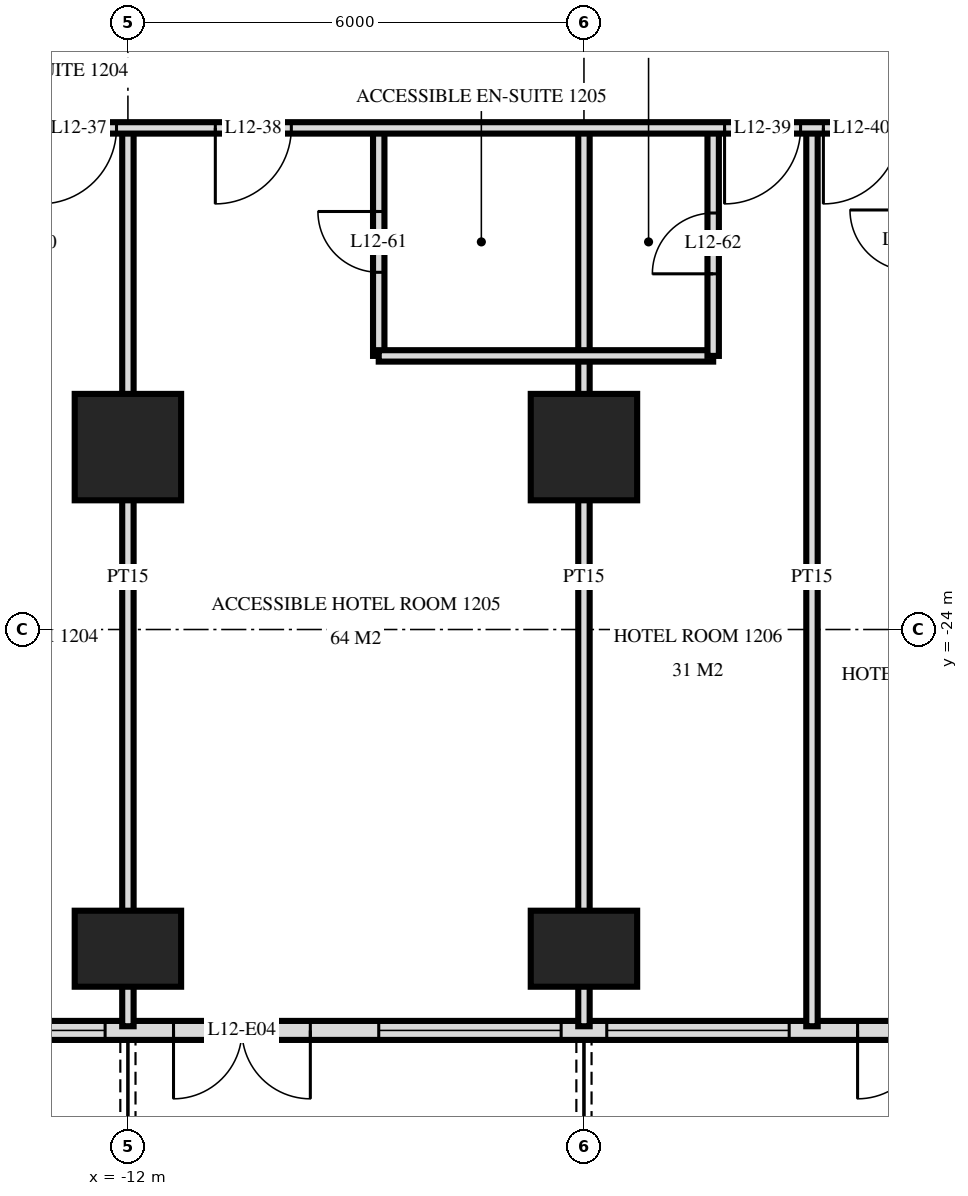
"""IFC4 building model, lengths in metres.
Left out: names, types, materials, properties, quantities, classifications, styles, units other than length and angle.
Written with IfcOpenShell. Run it as: python <this file> out.ifc"""

import sys

from ifc_helpers import new_model, si_unit, direction, frame, frame_2d, origin, origin_2d, place, context, subcontext, project, spatial, rectangle, extrude, element, fill, save


model = new_model("IFC4")
c1 = context("Model", 3, precision=1e-05, world=origin(), true_north=direction((0.0, 1.0)))
c2 = subcontext(c1, "Body", "Model", "MODEL_VIEW")
j1 = project(units=[si_unit("LENGTHUNIT", "METRE"), si_unit("PLANEANGLEUNIT", "RADIAN")], contexts=[c1])
p1 = place(None, origin())
s1 = spatial("IfcSite", under=j1, at=p1, CompositionType="ELEMENT")
p2 = place(p1, origin())
s2 = spatial("IfcBuilding", under=s1, at=p2, CompositionType="ELEMENT")
p3 = place(p2, frame((0.0, 0.0, 52.8)))
s3 = spatial("IfcBuildingStorey", under=s2, at=p3, CompositionType="ELEMENT", Elevation=52.8)
p4 = place(p3, frame((-12.0, -28.2, 0.0), z_axis=(0.0, 0.0, 1.0), x_axis=(1.0, 0.0, 0.0)))
e1 = element("IfcColumn", 1, at=p4, inside=s3, PredefinedType="COLUMN", context=c2, shape_type="SweptSolid", body=[
    extrude(rectangle(XDim=1.4, YDim=1.0, at=origin_2d()), origin(), (0.0, 0.0, 1.0), 3.6),
])
p5 = place(p3, frame((-12.0, -21.6, 0.0), z_axis=(0.0, 0.0, 1.0), x_axis=(1.0, 0.0, 0.0)))
e2 = element("IfcColumn", 2, at=p5, inside=s3, PredefinedType="COLUMN", context=c2, shape_type="SweptSolid", body=[
    extrude(rectangle(XDim=1.4, YDim=1.4, at=origin_2d()), origin(), (0.0, 0.0, 1.0), 3.6),
])
p6 = place(p3, frame((-6.0, -28.2, 0.0), z_axis=(0.0, 0.0, 1.0), x_axis=(1.0, 0.0, 0.0)))
e3 = element("IfcColumn", 3, at=p6, inside=s3, PredefinedType="COLUMN", context=c2, shape_type="SweptSolid", body=[
    extrude(rectangle(XDim=1.4, YDim=1.0, at=origin_2d()), origin(), (0.0, 0.0, 1.0), 3.6),
])
p7 = place(p3, frame((-6.0, -21.6, 0.0), z_axis=(0.0, 0.0, 1.0), x_axis=(1.0, 0.0, 0.0)))
e4 = element("IfcColumn", 4, at=p7, inside=s3, PredefinedType="COLUMN", context=c2, shape_type="SweptSolid", body=[
    extrude(rectangle(XDim=1.4, YDim=1.4, at=origin_2d()), origin(), (0.0, 0.0, 1.0), 3.6),
])
p8 = place(p3, frame((-28.775, -29.275, 0.0), z_axis=(0.0, 0.0, 1.0), x_axis=(1.0, 0.0, 0.0)))
e5 = element("IfcWall", 5, at=p8, inside=s3, PredefinedType="SOLIDWALL", context=c2, shape_type="SweptSolid", body=[
    extrude(rectangle(XDim=57.551, YDim=0.25, at=frame_2d((28.775, 0.0))), origin(), (0.0, 0.0, 1.0), 3.32),
])
p9 = place(p8, frame((0.575, 0.0, 0.0)))
e6 = element("IfcOpeningElement", 6, at=p9, cuts=e5, PredefinedType="OPENING", context=c2, shape_type="SweptSolid", body=[
    extrude(rectangle(XDim=1.8, YDim=2.4, at=frame_2d((0.9, 1.2))), frame((0.0, 0.135, 0.0), z_axis=(0.0, -1.0, 0.0), x_axis=(1.0, 0.0, 0.0)), (0.0, 0.0, 1.0), 0.27),
])
p10 = place(p8, frame((5.375, 0.0, 0.0)))
e7 = element("IfcOpeningElement", 7, at=p10, cuts=e5, PredefinedType="OPENING", context=c2, shape_type="SweptSolid", body=[
    extrude(rectangle(XDim=1.8, YDim=2.4, at=frame_2d((0.9, 1.2))), frame((0.0, 0.135, 0.0), z_axis=(0.0, -1.0, 0.0), x_axis=(1.0, 0.0, 0.0)), (0.0, 0.0, 1.0), 0.27),
])
p11 = place(p8, frame((8.075, 0.0, 0.3)))
e8 = element("IfcOpeningElement", 8, at=p11, cuts=e5, PredefinedType="OPENING", context=c2, shape_type="SweptSolid", body=[
    extrude(rectangle(XDim=2.4, YDim=2.1, at=frame_2d((1.2, 1.05))), frame((0.0, 0.135, 0.0), z_axis=(0.0, -1.0, 0.0), x_axis=(1.0, 0.0, 0.0)), (0.0, 0.0, 1.0), 0.27),
])
p12 = place(p8, frame((11.375, 0.0, 0.0)))
e9 = element("IfcOpeningElement", 9, at=p12, cuts=e5, PredefinedType="OPENING", context=c2, shape_type="SweptSolid", body=[
    extrude(rectangle(XDim=1.8, YDim=2.4, at=frame_2d((0.9, 1.2))), frame((0.0, 0.135, 0.0), z_axis=(0.0, -1.0, 0.0), x_axis=(1.0, 0.0, 0.0)), (0.0, 0.0, 1.0), 0.27),
])
p13 = place(p8, frame((14.075, 0.0, 0.3)))
e10 = element("IfcOpeningElement", 10, at=p13, cuts=e5, PredefinedType="OPENING", context=c2, shape_type="SweptSolid", body=[
    extrude(rectangle(XDim=2.4, YDim=2.1, at=frame_2d((1.2, 1.05))), frame((0.0, 0.135, 0.0), z_axis=(0.0, -1.0, 0.0), x_axis=(1.0, 0.0, 0.0)), (0.0, 0.0, 1.0), 0.27),
])
p14 = place(p8, frame((17.375, 0.0, 0.0)))
e11 = element("IfcOpeningElement", 11, at=p14, cuts=e5, PredefinedType="OPENING", context=c2, shape_type="SweptSolid", body=[
    extrude(rectangle(XDim=1.8, YDim=2.4, at=frame_2d((0.9, 1.2))), frame((0.0, 0.135, 0.0), z_axis=(0.0, -1.0, 0.0), x_axis=(1.0, 0.0, 0.0)), (0.0, 0.0, 1.0), 0.27),
])
p15 = place(p8, frame((20.075, 0.0, 0.3)))
e12 = element("IfcOpeningElement", 12, at=p15, cuts=e5, PredefinedType="OPENING", context=c2, shape_type="SweptSolid", body=[
    extrude(rectangle(XDim=2.4, YDim=2.1, at=frame_2d((1.2, 1.05))), frame((0.0, 0.135, 0.0), z_axis=(0.0, -1.0, 0.0), x_axis=(1.0, 0.0, 0.0)), (0.0, 0.0, 1.0), 0.27),
])
p16 = place(p8, frame((23.075, 0.0, 0.3)))
e13 = element("IfcOpeningElement", 13, at=p16, cuts=e5, PredefinedType="OPENING", context=c2, shape_type="SweptSolid", body=[
    extrude(rectangle(XDim=2.4, YDim=2.1, at=frame_2d((1.2, 1.05))), frame((0.0, 0.135, 0.0), z_axis=(0.0, -1.0, 0.0), x_axis=(1.0, 0.0, 0.0)), (0.0, 0.0, 1.0), 0.27),
])
p17 = place(p8, frame((26.375, 0.0, 0.0)))
e14 = element("IfcOpeningElement", 14, at=p17, cuts=e5, PredefinedType="OPENING", context=c2, shape_type="SweptSolid", body=[
    extrude(rectangle(XDim=1.8, YDim=2.4, at=frame_2d((0.9, 1.2))), frame((0.0, 0.135, 0.0), z_axis=(0.0, -1.0, 0.0), x_axis=(1.0, 0.0, 0.0)), (0.0, 0.0, 1.0), 0.27),
])
p18 = place(p8, frame((29.375, 0.0, 0.0)))
e15 = element("IfcOpeningElement", 15, at=p18, cuts=e5, PredefinedType="OPENING", context=c2, shape_type="SweptSolid", body=[
    extrude(rectangle(XDim=1.8, YDim=2.4, at=frame_2d((0.9, 1.2))), frame((0.0, 0.135, 0.0), z_axis=(0.0, -1.0, 0.0), x_axis=(1.0, 0.0, 0.0)), (0.0, 0.0, 1.0), 0.27),
])
p19 = place(p8, frame((32.075, 0.0, 0.3)))
e16 = element("IfcOpeningElement", 16, at=p19, cuts=e5, PredefinedType="OPENING", context=c2, shape_type="SweptSolid", body=[
    extrude(rectangle(XDim=2.4, YDim=2.1, at=frame_2d((1.2, 1.05))), frame((0.0, 0.135, 0.0), z_axis=(0.0, -1.0, 0.0), x_axis=(1.0, 0.0, 0.0)), (0.0, 0.0, 1.0), 0.27),
])
p20 = place(p8, frame((35.075, 0.0, 0.3)))
e17 = element("IfcOpeningElement", 17, at=p20, cuts=e5, PredefinedType="OPENING", context=c2, shape_type="SweptSolid", body=[
    extrude(rectangle(XDim=2.4, YDim=2.1, at=frame_2d((1.2, 1.05))), frame((0.0, 0.135, 0.0), z_axis=(0.0, -1.0, 0.0), x_axis=(1.0, 0.0, 0.0)), (0.0, 0.0, 1.0), 0.27),
])
p21 = place(p8, frame((38.375, 0.0, 0.0)))
e18 = element("IfcOpeningElement", 18, at=p21, cuts=e5, PredefinedType="OPENING", context=c2, shape_type="SweptSolid", body=[
    extrude(rectangle(XDim=1.8, YDim=2.4, at=frame_2d((0.9, 1.2))), frame((0.0, 0.135, 0.0), z_axis=(0.0, -1.0, 0.0), x_axis=(1.0, 0.0, 0.0)), (0.0, 0.0, 1.0), 0.27),
])
p22 = place(p8, frame((41.375, 0.0, 0.0)))
e19 = element("IfcOpeningElement", 19, at=p22, cuts=e5, PredefinedType="OPENING", context=c2, shape_type="SweptSolid", body=[
    extrude(rectangle(XDim=1.8, YDim=2.4, at=frame_2d((0.9, 1.2))), frame((0.0, 0.135, 0.0), z_axis=(0.0, -1.0, 0.0), x_axis=(1.0, 0.0, 0.0)), (0.0, 0.0, 1.0), 0.27),
])
p23 = place(p8, frame((44.075, 0.0, 0.3)))
e20 = element("IfcOpeningElement", 20, at=p23, cuts=e5, PredefinedType="OPENING", context=c2, shape_type="SweptSolid", body=[
    extrude(rectangle(XDim=2.4, YDim=2.1, at=frame_2d((1.2, 1.05))), frame((0.0, 0.135, 0.0), z_axis=(0.0, -1.0, 0.0), x_axis=(1.0, 0.0, 0.0)), (0.0, 0.0, 1.0), 0.27),
])
p24 = place(p8, frame((47.075, 0.0, 0.3)))
e21 = element("IfcOpeningElement", 21, at=p24, cuts=e5, PredefinedType="OPENING", context=c2, shape_type="SweptSolid", body=[
    extrude(rectangle(XDim=2.4, YDim=2.1, at=frame_2d((1.2, 1.05))), frame((0.0, 0.135, 0.0), z_axis=(0.0, -1.0, 0.0), x_axis=(1.0, 0.0, 0.0)), (0.0, 0.0, 1.0), 0.27),
])
p25 = place(p8, frame((50.375, 0.0, 0.0)))
e22 = element("IfcOpeningElement", 22, at=p25, cuts=e5, PredefinedType="OPENING", context=c2, shape_type="SweptSolid", body=[
    extrude(rectangle(XDim=1.8, YDim=2.4, at=frame_2d((0.9, 1.2))), frame((0.0, 0.135, 0.0), z_axis=(0.0, -1.0, 0.0), x_axis=(1.0, 0.0, 0.0)), (0.0, 0.0, 1.0), 0.27),
])
p26 = place(p8, frame((53.375, 0.0, 0.0)))
e23 = element("IfcOpeningElement", 23, at=p26, cuts=e5, PredefinedType="OPENING", context=c2, shape_type="SweptSolid", body=[
    extrude(rectangle(XDim=1.8, YDim=2.4, at=frame_2d((0.9, 1.2))), frame((0.0, 0.135, 0.0), z_axis=(0.0, -1.0, 0.0), x_axis=(1.0, 0.0, 0.0)), (0.0, 0.0, 1.0), 0.27),
])
p27 = place(p3, frame((-3.0, -29.22, 0.0), z_axis=(0.0, 0.0, 1.0), x_axis=(0.0, 1.0, 0.0)))
e24 = element("IfcWall", 24, at=p27, inside=s3, PredefinedType="PARTITIONING", context=c2, shape_type="SweptSolid", body=[
    extrude(rectangle(XDim=11.82, YDim=0.15, at=frame_2d((5.91, 0.0))), origin(), (0.0, 0.0, 1.0), 3.32),
])
p28 = place(p3, frame((-4.3, -20.4, 0.0), z_axis=(0.0, 0.0, 1.0), x_axis=(0.0, 1.0, 0.0)))
e25 = element("IfcWall", 25, at=p28, inside=s3, PredefinedType="PARTITIONING", context=c2, shape_type="SweptSolid", body=[
    extrude(rectangle(XDim=3.0, YDim=0.15, at=frame_2d((1.5, 0.0))), origin(), (0.0, 0.0, 1.0), 3.32),
])
p29 = place(p28, frame((1.08, 0.0, 0.0)))
e26 = element("IfcOpeningElement", 26, at=p29, cuts=e25, PredefinedType="OPENING", context=c2, shape_type="SweptSolid", body=[
    extrude(rectangle(XDim=0.8, YDim=2.1, at=frame_2d((0.4, 1.05))), frame((0.0, 0.085, 0.0), z_axis=(0.0, -1.0, 0.0), x_axis=(1.0, 0.0, 0.0)), (0.0, 0.0, 1.0), 0.17),
])
p30 = place(p3, frame((-6.0, -29.22, 0.0), z_axis=(0.0, 0.0, 1.0), x_axis=(0.0, 1.0, 0.0)))
e27 = element("IfcWall", 27, at=p30, inside=s3, PredefinedType="PARTITIONING", context=c2, shape_type="SweptSolid", body=[
    extrude(rectangle(XDim=11.82, YDim=0.15, at=frame_2d((5.91, 0.0))), origin(), (0.0, 0.0, 1.0), 3.32),
])
p31 = place(p3, frame((-8.7, -20.4, 0.0), z_axis=(0.0, 0.0, 1.0), x_axis=(0.0, 1.0, 0.0)))
e28 = element("IfcWall", 28, at=p31, inside=s3, PredefinedType="PARTITIONING", context=c2, shape_type="SweptSolid", body=[
    extrude(rectangle(XDim=3.0, YDim=0.15, at=frame_2d((1.5, 0.0))), origin(), (0.0, 0.0, 1.0), 3.32),
])
p32 = place(p31, frame((1.1, 0.0, 0.0)))
e29 = element("IfcOpeningElement", 29, at=p32, cuts=e28, PredefinedType="OPENING", context=c2, shape_type="SweptSolid", body=[
    extrude(rectangle(XDim=0.8, YDim=2.1, at=frame_2d((0.4, 1.05))), frame((0.0, 0.085, 0.0), z_axis=(0.0, -1.0, 0.0), x_axis=(1.0, 0.0, 0.0)), (0.0, 0.0, 1.0), 0.17),
])
p33 = place(p3, frame((-12.0, -29.22, 0.0), z_axis=(0.0, 0.0, 1.0), x_axis=(0.0, 1.0, 0.0)))
e30 = element("IfcWall", 30, at=p33, inside=s3, PredefinedType="PARTITIONING", context=c2, shape_type="SweptSolid", body=[
    extrude(rectangle(XDim=11.82, YDim=0.15, at=frame_2d((5.91, 0.0))), origin(), (0.0, 0.0, 1.0), 3.32),
])
p34 = place(p3, frame((-8.7, -20.4, 0.0), z_axis=(0.0, 0.0, 1.0), x_axis=(1.0, 0.0, 0.0)))
e31 = element("IfcWall", 31, at=p34, inside=s3, PredefinedType="PARTITIONING", context=c2, shape_type="SweptSolid", body=[
    extrude(rectangle(XDim=4.4, YDim=0.15, at=frame_2d((2.2, 0.0))), origin(), (0.0, 0.0, 1.0), 3.32),
])
p35 = place(p3, frame((-33.12, -17.4, 0.0), z_axis=(0.0, 0.0, 1.0), x_axis=(1.0, 0.0, 0.0)))
e32 = element("IfcWall", 32, at=p35, inside=s3, PredefinedType="PARTITIONING", context=c2, shape_type="SweptSolid", body=[
    extrude(rectangle(XDim=66.24, YDim=0.15, at=frame_2d((33.12, 0.0))), origin(), (0.0, 0.0, 1.0), 3.32),
])
p36 = place(p35, frame((9.27, 0.0, 0.0)))
e33 = element("IfcOpeningElement", 33, at=p36, cuts=e32, PredefinedType="OPENING", context=c2, shape_type="SweptSolid", body=[
    extrude(rectangle(XDim=1.0, YDim=2.1, at=frame_2d((0.5, 1.05))), frame((0.0, 0.085, 0.0), z_axis=(0.0, -1.0, 0.0), x_axis=(1.0, 0.0, 0.0)), (0.0, 0.0, 1.0), 0.17),
])
p37 = place(p35, frame((13.97, 0.0, 0.0)))
e34 = element("IfcOpeningElement", 34, at=p37, cuts=e32, PredefinedType="OPENING", context=c2, shape_type="SweptSolid", body=[
    extrude(rectangle(XDim=1.0, YDim=2.1, at=frame_2d((0.5, 1.05))), frame((0.0, 0.085, 0.0), z_axis=(0.0, -1.0, 0.0), x_axis=(1.0, 0.0, 0.0)), (0.0, 0.0, 1.0), 0.17),
])
p38 = place(p35, frame((15.27, 0.0, 0.0)))
e35 = element("IfcOpeningElement", 35, at=p38, cuts=e32, PredefinedType="OPENING", context=c2, shape_type="SweptSolid", body=[
    extrude(rectangle(XDim=1.0, YDim=2.1, at=frame_2d((0.5, 1.05))), frame((0.0, 0.085, 0.0), z_axis=(0.0, -1.0, 0.0), x_axis=(1.0, 0.0, 0.0)), (0.0, 0.0, 1.0), 0.17),
])
p39 = place(p35, frame((19.97, 0.0, 0.0)))
e36 = element("IfcOpeningElement", 36, at=p39, cuts=e32, PredefinedType="OPENING", context=c2, shape_type="SweptSolid", body=[
    extrude(rectangle(XDim=1.0, YDim=2.1, at=frame_2d((0.5, 1.05))), frame((0.0, 0.085, 0.0), z_axis=(0.0, -1.0, 0.0), x_axis=(1.0, 0.0, 0.0)), (0.0, 0.0, 1.0), 0.17),
])
p40 = place(p35, frame((22.27, 0.0, 0.0)))
e37 = element("IfcOpeningElement", 37, at=p40, cuts=e32, PredefinedType="OPENING", context=c2, shape_type="SweptSolid", body=[
    extrude(rectangle(XDim=1.0, YDim=2.1, at=frame_2d((0.5, 1.05))), frame((0.0, 0.085, 0.0), z_axis=(0.0, -1.0, 0.0), x_axis=(1.0, 0.0, 0.0)), (0.0, 0.0, 1.0), 0.17),
])
p41 = place(p35, frame((28.97, 0.0, 0.0)))
e38 = element("IfcOpeningElement", 38, at=p41, cuts=e32, PredefinedType="OPENING", context=c2, shape_type="SweptSolid", body=[
    extrude(rectangle(XDim=1.0, YDim=2.1, at=frame_2d((0.5, 1.05))), frame((0.0, 0.085, 0.0), z_axis=(0.0, -1.0, 0.0), x_axis=(1.0, 0.0, 0.0)), (0.0, 0.0, 1.0), 0.17),
])
p42 = place(p35, frame((30.27, 0.0, 0.0)))
e39 = element("IfcOpeningElement", 39, at=p42, cuts=e32, PredefinedType="OPENING", context=c2, shape_type="SweptSolid", body=[
    extrude(rectangle(XDim=1.0, YDim=2.1, at=frame_2d((0.5, 1.05))), frame((0.0, 0.085, 0.0), z_axis=(0.0, -1.0, 0.0), x_axis=(1.0, 0.0, 0.0)), (0.0, 0.0, 1.0), 0.17),
])
p43 = place(p35, frame((34.97, 0.0, 0.0)))
e40 = element("IfcOpeningElement", 40, at=p43, cuts=e32, PredefinedType="OPENING", context=c2, shape_type="SweptSolid", body=[
    extrude(rectangle(XDim=1.0, YDim=2.1, at=frame_2d((0.5, 1.05))), frame((0.0, 0.085, 0.0), z_axis=(0.0, -1.0, 0.0), x_axis=(1.0, 0.0, 0.0)), (0.0, 0.0, 1.0), 0.17),
])
p44 = place(p35, frame((36.27, 0.0, 0.0)))
e41 = element("IfcOpeningElement", 41, at=p44, cuts=e32, PredefinedType="OPENING", context=c2, shape_type="SweptSolid", body=[
    extrude(rectangle(XDim=1.0, YDim=2.1, at=frame_2d((0.5, 1.05))), frame((0.0, 0.085, 0.0), z_axis=(0.0, -1.0, 0.0), x_axis=(1.0, 0.0, 0.0)), (0.0, 0.0, 1.0), 0.17),
])
p45 = place(p35, frame((39.82, 0.0, 0.0)))
e42 = element("IfcOpeningElement", 42, at=p45, cuts=e32, PredefinedType="OPENING", context=c2, shape_type="SweptSolid", body=[
    extrude(rectangle(XDim=1.0, YDim=2.1, at=frame_2d((0.5, 1.05))), frame((0.0, 0.085, 0.0), z_axis=(0.0, -1.0, 0.0), x_axis=(1.0, 0.0, 0.0)), (0.0, 0.0, 1.0), 0.17),
])
p46 = place(p35, frame((51.27, 0.0, 0.0)))
e43 = element("IfcOpeningElement", 43, at=p46, cuts=e32, PredefinedType="OPENING", context=c2, shape_type="SweptSolid", body=[
    extrude(rectangle(XDim=1.0, YDim=2.1, at=frame_2d((0.5, 1.05))), frame((0.0, 0.085, 0.0), z_axis=(0.0, -1.0, 0.0), x_axis=(1.0, 0.0, 0.0)), (0.0, 0.0, 1.0), 0.17),
])
p47 = place(p35, frame((4.42, 0.0, 0.0)))
e44 = element("IfcOpeningElement", 44, at=p47, cuts=e32, PredefinedType="OPENING", context=c2, shape_type="SweptSolid", body=[
    extrude(rectangle(XDim=1.0, YDim=2.1, at=frame_2d((0.5, 1.05))), frame((0.0, 0.085, 0.0), z_axis=(0.0, -1.0, 0.0), x_axis=(1.0, 0.0, 0.0)), (0.0, 0.0, 1.0), 0.17),
])
p48 = place(p35, frame((54.82, 0.0, 0.0)))
e45 = element("IfcOpeningElement", 45, at=p48, cuts=e32, PredefinedType="OPENING", context=c2, shape_type="SweptSolid", body=[
    extrude(rectangle(XDim=1.0, YDim=2.1, at=frame_2d((0.5, 1.05))), frame((0.0, 0.085, 0.0), z_axis=(0.0, -1.0, 0.0), x_axis=(1.0, 0.0, 0.0)), (0.0, 0.0, 1.0), 0.17),
])
p49 = place(p13, origin())
e46 = element("IfcWindow", 46, at=p49, inside=s3, PartitioningType="SINGLE_PANEL", PredefinedType="WINDOW", context=c2, shape_type="SweptSolid", body=[
    extrude(rectangle(XDim=2.4, YDim=2.1, at=frame_2d((1.2, 1.05))), frame((0.0, 0.03, 0.0), z_axis=(0.0, -1.0, 0.0), x_axis=(1.0, 0.0, 0.0)), (0.0, 0.0, 1.0), 0.06),
])
fill(e10, e46)
p50 = place(p14, frame((0.9, 0.0, 0.0), z_axis=(0.0, 0.0, 1.0), x_axis=(-1.0, 0.0, 0.0)))
e47 = element("IfcDoor", 47, at=p50, inside=s3, OperationType="DOUBLE_DOOR_SINGLE_SWING", PredefinedType="DOOR", context=c2, shape_type="SweptSolid", body=[
    extrude(rectangle(XDim=1.8, YDim=2.4, at=frame_2d((0.0, 1.2))), frame((0.0, -0.025, 0.0), z_axis=(0.0, 1.0, 0.0), x_axis=(-1.0, 0.0, 0.0)), (0.0, 0.0, 1.0), 0.05),
])
fill(e11, e47)
p51 = place(p15, origin())
e48 = element("IfcWindow", 48, at=p51, inside=s3, PartitioningType="SINGLE_PANEL", PredefinedType="WINDOW", context=c2, shape_type="SweptSolid", body=[
    extrude(rectangle(XDim=2.4, YDim=2.1, at=frame_2d((1.2, 1.05))), frame((0.0, 0.03, 0.0), z_axis=(0.0, -1.0, 0.0), x_axis=(1.0, 0.0, 0.0)), (0.0, 0.0, 1.0), 0.06),
])
fill(e12, e48)
p52 = place(p16, origin())
e49 = element("IfcWindow", 49, at=p52, inside=s3, PartitioningType="SINGLE_PANEL", PredefinedType="WINDOW", context=c2, shape_type="SweptSolid", body=[
    extrude(rectangle(XDim=2.4, YDim=2.1, at=frame_2d((1.2, 1.05))), frame((0.0, 0.03, 0.0), z_axis=(0.0, -1.0, 0.0), x_axis=(1.0, 0.0, 0.0)), (0.0, 0.0, 1.0), 0.06),
])
fill(e13, e49)
p53 = place(p17, frame((0.9, 0.0, 0.0), z_axis=(0.0, 0.0, 1.0), x_axis=(-1.0, 0.0, 0.0)))
e50 = element("IfcDoor", 50, at=p53, inside=s3, OperationType="DOUBLE_DOOR_SINGLE_SWING", PredefinedType="DOOR", context=c2, shape_type="SweptSolid", body=[
    extrude(rectangle(XDim=1.8, YDim=2.4, at=frame_2d((0.0, 1.2))), frame((0.0, -0.025, 0.0), z_axis=(0.0, 1.0, 0.0), x_axis=(-1.0, 0.0, 0.0)), (0.0, 0.0, 1.0), 0.05),
])
fill(e14, e50)
p54 = place(p39, frame((0.5, 0.0, 0.0), z_axis=(0.0, 0.0, 1.0), x_axis=(-1.0, 0.0, 0.0)))
e51 = element("IfcDoor", 51, at=p54, inside=s3, OperationType="SINGLE_SWING_LEFT", PredefinedType="DOOR", context=c2, shape_type="SweptSolid", body=[
    extrude(rectangle(XDim=1.0, YDim=2.1, at=frame_2d((0.0, 1.05))), frame((0.0, -0.025, 0.0), z_axis=(0.0, 1.0, 0.0), x_axis=(-1.0, 0.0, 0.0)), (0.0, 0.0, 1.0), 0.05),
])
fill(e36, e51)
p55 = place(p40, frame((0.5, 0.0, 0.0), z_axis=(0.0, 0.0, 1.0), x_axis=(-1.0, 0.0, 0.0)))
e52 = element("IfcDoor", 52, at=p55, inside=s3, OperationType="SINGLE_SWING_LEFT", PredefinedType="DOOR", context=c2, shape_type="SweptSolid", body=[
    extrude(rectangle(XDim=1.0, YDim=2.1, at=frame_2d((0.0, 1.05))), frame((0.0, -0.025, 0.0), z_axis=(0.0, 1.0, 0.0), x_axis=(-1.0, 0.0, 0.0)), (0.0, 0.0, 1.0), 0.05),
])
fill(e37, e52)
p56 = place(p41, frame((0.5, 0.0, 0.0), z_axis=(0.0, 0.0, 1.0), x_axis=(-1.0, 0.0, 0.0)))
e53 = element("IfcDoor", 53, at=p56, inside=s3, OperationType="SINGLE_SWING_LEFT", PredefinedType="DOOR", context=c2, shape_type="SweptSolid", body=[
    extrude(rectangle(XDim=1.0, YDim=2.1, at=frame_2d((0.0, 1.05))), frame((0.0, -0.025, 0.0), z_axis=(0.0, 1.0, 0.0), x_axis=(-1.0, 0.0, 0.0)), (0.0, 0.0, 1.0), 0.05),
])
fill(e38, e53)
p57 = place(p42, frame((0.5, 0.0, 0.0), z_axis=(0.0, 0.0, 1.0), x_axis=(-1.0, 0.0, 0.0)))
e54 = element("IfcDoor", 54, at=p57, inside=s3, OperationType="SINGLE_SWING_LEFT", PredefinedType="DOOR", context=c2, shape_type="SweptSolid", body=[
    extrude(rectangle(XDim=1.0, YDim=2.1, at=frame_2d((0.0, 1.05))), frame((0.0, -0.025, 0.0), z_axis=(0.0, 1.0, 0.0), x_axis=(-1.0, 0.0, 0.0)), (0.0, 0.0, 1.0), 0.05),
])
fill(e39, e54)
p58 = place(p32, origin())
e55 = element("IfcDoor", 55, at=p58, inside=s3, OperationType="SINGLE_SWING_LEFT", PredefinedType="DOOR", context=c2, shape_type="SweptSolid", body=[
    extrude(rectangle(XDim=0.8, YDim=2.1, at=frame_2d((0.4, 1.05))), frame((0.0, 0.025, 0.0), z_axis=(0.0, -1.0, 0.0), x_axis=(1.0, 0.0, 0.0)), (0.0, 0.0, 1.0), 0.05),
])
fill(e29, e55)
p59 = place(p29, origin())
e56 = element("IfcDoor", 56, at=p59, inside=s3, OperationType="SINGLE_SWING_RIGHT", PredefinedType="DOOR", context=c2, shape_type="SweptSolid", body=[
    extrude(rectangle(XDim=0.8, YDim=2.1, at=frame_2d((0.4, 1.05))), frame((0.0, 0.025, 0.0), z_axis=(0.0, -1.0, 0.0), x_axis=(1.0, 0.0, 0.0)), (0.0, 0.0, 1.0), 0.05),
])
fill(e26, e56)
save(model, sys.argv[1])
